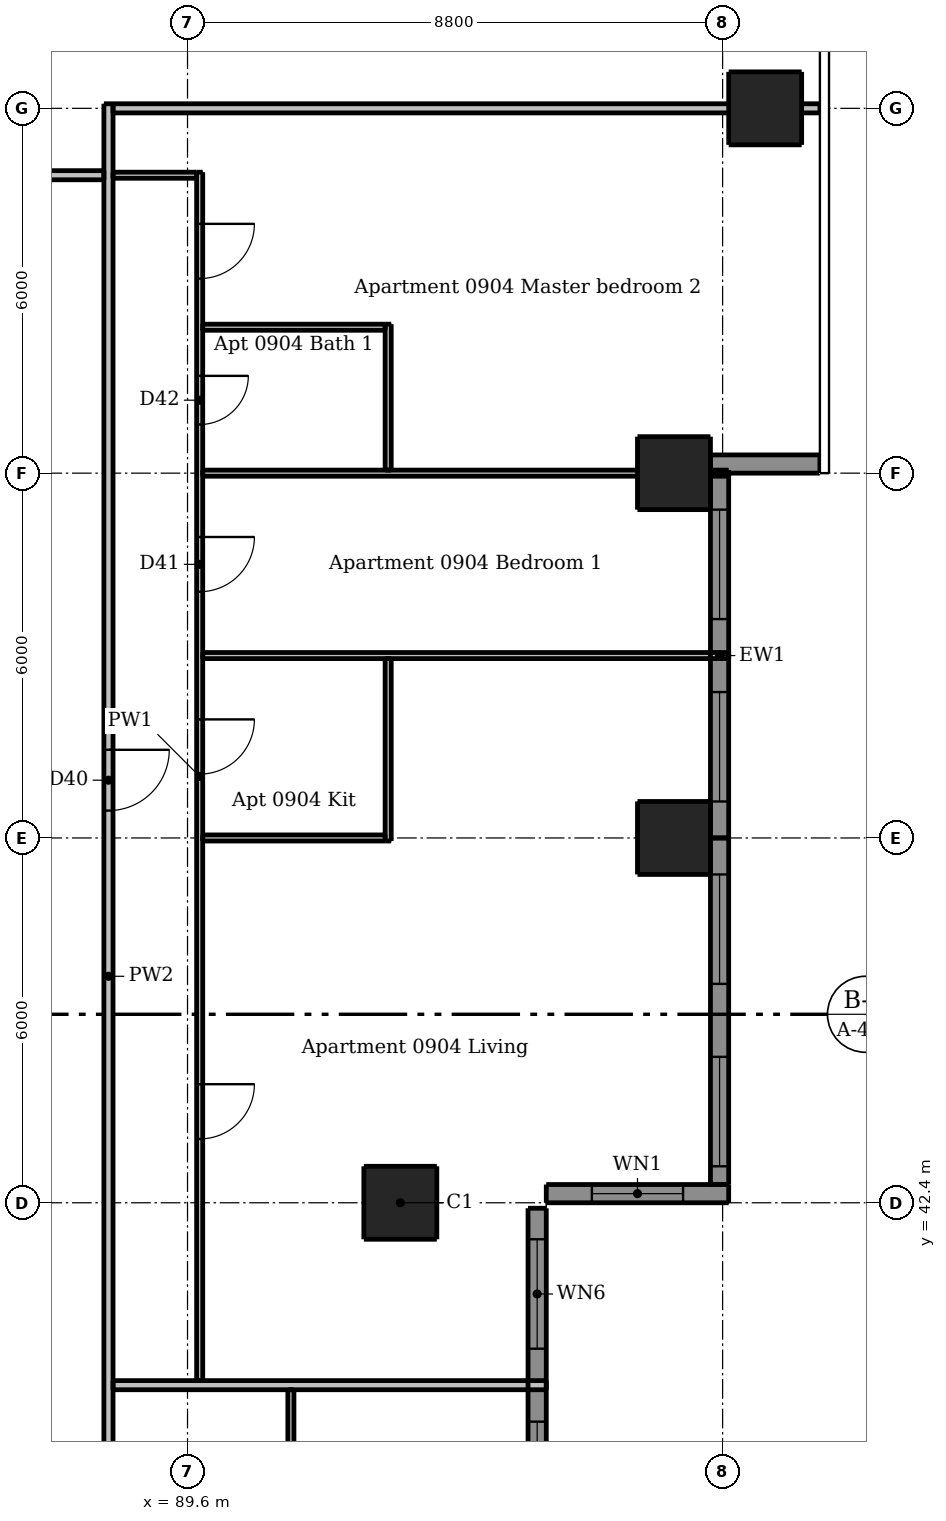
"""IFC4 building model, lengths in metres.
Left out: names, types, materials, properties, quantities, classifications, styles, units other than length and angle.
Written with IfcOpenShell. Run it as: python <this file> out.ifc"""

import sys

from ifc_helpers import new_model, si_unit, direction, frame, frame_2d, origin, origin_2d, place, context, subcontext, project, spatial, rectangle, extrude, element, fill, save


model = new_model("IFC4")
c1 = context("Model", 3, precision=1e-05, world=origin(), true_north=direction((0.0, 1.0)))
c2 = subcontext(c1, "Body", "Model", "MODEL_VIEW")
j1 = project(units=[si_unit("LENGTHUNIT", "METRE"), si_unit("PLANEANGLEUNIT", "RADIAN")], contexts=[c1])
p1 = place(None, origin())
s1 = spatial("IfcSite", under=j1, at=p1, CompositionType="ELEMENT")
p2 = place(p1, origin())
s2 = spatial("IfcBuilding", under=s1, at=p2, CompositionType="ELEMENT")
p3 = place(p2, frame((0.0, 0.0, 36.7)))
s3 = spatial("IfcBuildingStorey", under=s2, at=p3, CompositionType="ELEMENT", Elevation=36.7)
for number, where, z_axis, x_axis in (
    (1, (93.1, 42.4, 0.0), (0.0, 0.0, 1.0), (1.0, 0.0, 0.0)),
    (2, (97.6, 48.4, 0.0), (0.0, 0.0, 1.0), (1.0, 0.0, 0.0)),
    (3, (97.6, 54.4, 0.0), (0.0, 0.0, 1.0), (1.0, 0.0, 0.0)),
    (4, (99.1, 60.4, 0.0), (0.0, 0.0, 1.0), (1.0, 0.0, 0.0)),
):
    element("IfcColumn", number, at=place(p3, frame(where, z_axis=z_axis, x_axis=x_axis)), inside=s3, PredefinedType="COLUMN", context=c2, shape_type="SweptSolid", body=[
        extrude(rectangle(XDim=1.2, YDim=1.2, at=origin_2d()), origin(), (0.0, 0.0, 1.0), 3.05),
    ])
p4 = place(p3, frame((95.5, 42.55, 0.0), z_axis=(0.0, 0.0, 1.0), x_axis=(1.0, 0.0, 0.0)))
e5 = element("IfcWall", 5, at=p4, inside=s3, PredefinedType="SOLIDWALL", context=c2, shape_type="SweptSolid", body=[
    extrude(rectangle(XDim=3.0, YDim=0.3, at=frame_2d((1.5, 0.0))), origin(), (0.0, 0.0, 1.0), 3.05),
])
p5 = place(p4, frame((0.75, 0.0, 0.9)))
e6 = element("IfcOpeningElement", 6, at=p5, cuts=e5, PredefinedType="OPENING", context=c2, shape_type="SweptSolid", body=[
    extrude(rectangle(XDim=1.5, YDim=1.5, at=frame_2d((0.75, 0.75))), frame((0.0, 0.16, 0.0), z_axis=(0.0, -1.0, 0.0), x_axis=(1.0, 0.0, 0.0)), (0.0, 0.0, 1.0), 0.32),
])
p6 = place(p3, frame((98.2, 54.55, 0.0), z_axis=(0.0, 0.0, 1.0), x_axis=(1.0, 0.0, 0.0)))
e7 = element("IfcWall", 7, at=p6, inside=s3, PredefinedType="SOLIDWALL", context=c2, shape_type="SweptSolid", body=[
    extrude(rectangle(XDim=1.8, YDim=0.3, at=frame_2d((0.9, 0.0))), origin(), (0.0, 0.0, 1.0), 3.05),
])
p7 = place(p3, frame((95.35, 36.7, 0.0), z_axis=(0.0, 0.0, 1.0), x_axis=(0.0, 1.0, 0.0)))
e8 = element("IfcWall", 8, at=p7, inside=s3, PredefinedType="SOLIDWALL", context=c2, shape_type="SweptSolid", body=[
    extrude(rectangle(XDim=5.61, YDim=0.3, at=frame_2d((2.805, 0.0))), origin(), (0.0, 0.0, 1.0), 3.05),
])
p8 = place(p7, frame((0.3, 0.0, 0.15)))
e9 = element("IfcOpeningElement", 9, at=p8, cuts=e8, PredefinedType="OPENING", context=c2, shape_type="SweptSolid", body=[
    extrude(rectangle(XDim=1.8, YDim=2.1, at=frame_2d((0.9, 1.05))), frame((0.0, 0.16, 0.0), z_axis=(0.0, -1.0, 0.0), x_axis=(1.0, 0.0, 0.0)), (0.0, 0.0, 1.0), 0.32),
])
p9 = place(p7, frame((3.3, 0.0, 0.15)))
e10 = element("IfcOpeningElement", 10, at=p9, cuts=e8, PredefinedType="OPENING", context=c2, shape_type="SweptSolid", body=[
    extrude(rectangle(XDim=1.8, YDim=2.1, at=frame_2d((0.9, 1.05))), frame((0.0, 0.16, 0.0), z_axis=(0.0, -1.0, 0.0), x_axis=(1.0, 0.0, 0.0)), (0.0, 0.0, 1.0), 0.32),
])
p10 = place(p3, frame((98.35, 42.7, 0.0), z_axis=(0.0, 0.0, 1.0), x_axis=(0.0, 1.0, 0.0)))
e11 = element("IfcWall", 11, at=p10, inside=s3, PredefinedType="SOLIDWALL", context=c2, shape_type="SweptSolid", body=[
    extrude(rectangle(XDim=5.7, YDim=0.3, at=frame_2d((2.85, 0.0))), origin(), (0.0, 0.0, 1.0), 3.05),
])
p11 = place(p10, frame((0.3, 0.0, 0.15)))
e12 = element("IfcOpeningElement", 12, at=p11, cuts=e11, PredefinedType="OPENING", context=c2, shape_type="SweptSolid", body=[
    extrude(rectangle(XDim=1.8, YDim=2.1, at=frame_2d((0.9, 1.05))), frame((0.0, 0.16, 0.0), z_axis=(0.0, -1.0, 0.0), x_axis=(1.0, 0.0, 0.0)), (0.0, 0.0, 1.0), 0.32),
])
p12 = place(p10, frame((3.3, 0.0, 0.15)))
e13 = element("IfcOpeningElement", 13, at=p12, cuts=e11, PredefinedType="OPENING", context=c2, shape_type="SweptSolid", body=[
    extrude(rectangle(XDim=1.8, YDim=2.1, at=frame_2d((0.9, 1.05))), frame((0.0, 0.16, 0.0), z_axis=(0.0, -1.0, 0.0), x_axis=(1.0, 0.0, 0.0)), (0.0, 0.0, 1.0), 0.32),
])
p13 = place(p3, frame((98.35, 48.4, 0.0), z_axis=(0.0, 0.0, 1.0), x_axis=(0.0, 1.0, 0.0)))
e14 = element("IfcWall", 14, at=p13, inside=s3, PredefinedType="SOLIDWALL", context=c2, shape_type="SweptSolid", body=[
    extrude(rectangle(XDim=6.0, YDim=0.3, at=frame_2d((3.0, 0.0))), origin(), (0.0, 0.0, 1.0), 3.05),
])
p14 = place(p13, frame((0.6, 0.0, 0.15)))
e15 = element("IfcOpeningElement", 15, at=p14, cuts=e14, PredefinedType="OPENING", context=c2, shape_type="SweptSolid", body=[
    extrude(rectangle(XDim=1.8, YDim=2.1, at=frame_2d((0.9, 1.05))), frame((0.0, 0.16, 0.0), z_axis=(0.0, -1.0, 0.0), x_axis=(1.0, 0.0, 0.0)), (0.0, 0.0, 1.0), 0.32),
])
p15 = place(p13, frame((3.6, 0.0, 0.15)))
e16 = element("IfcOpeningElement", 16, at=p15, cuts=e14, PredefinedType="OPENING", context=c2, shape_type="SweptSolid", body=[
    extrude(rectangle(XDim=1.8, YDim=2.1, at=frame_2d((0.9, 1.05))), frame((0.0, 0.16, 0.0), z_axis=(0.0, -1.0, 0.0), x_axis=(1.0, 0.0, 0.0)), (0.0, 0.0, 1.0), 0.32),
])
p16 = place(p3, frame((89.8, 59.35, 0.0), z_axis=(0.0, 0.0, 1.0), x_axis=(0.0, -1.0, 0.0)))
e17 = element("IfcWall", 17, at=p16, inside=s3, PredefinedType="PARTITIONING", context=c2, shape_type="SweptSolid", body=[
    extrude(rectangle(XDim=19.875, YDim=0.1, at=frame_2d((9.938, 0.0))), origin(), (0.0, 0.0, 1.0), 3.05),
])
p17 = place(p16, frame((15.0, 0.0, 0.0)))
e18 = element("IfcOpeningElement", 18, at=p17, cuts=e17, PredefinedType="OPENING", context=c2, shape_type="SweptSolid", body=[
    extrude(rectangle(XDim=0.9, YDim=2.1, at=frame_2d((0.45, 1.05))), frame((0.0, 0.06, 0.0), z_axis=(0.0, -1.0, 0.0), x_axis=(1.0, 0.0, 0.0)), (0.0, 0.0, 1.0), 0.12),
])
p18 = place(p16, frame((9.0, 0.0, 0.0)))
e19 = element("IfcOpeningElement", 19, at=p18, cuts=e17, PredefinedType="OPENING", context=c2, shape_type="SweptSolid", body=[
    extrude(rectangle(XDim=0.9, YDim=2.1, at=frame_2d((0.45, 1.05))), frame((0.0, 0.06, 0.0), z_axis=(0.0, -1.0, 0.0), x_axis=(1.0, 0.0, 0.0)), (0.0, 0.0, 1.0), 0.12),
])
p19 = place(p16, frame((6.0, 0.0, 0.0)))
e20 = element("IfcOpeningElement", 20, at=p19, cuts=e17, PredefinedType="OPENING", context=c2, shape_type="SweptSolid", body=[
    extrude(rectangle(XDim=0.9, YDim=2.1, at=frame_2d((0.45, 1.05))), frame((0.0, 0.06, 0.0), z_axis=(0.0, -1.0, 0.0), x_axis=(1.0, 0.0, 0.0)), (0.0, 0.0, 1.0), 0.12),
])
p20 = place(p16, frame((0.85, 0.0, 0.0)))
e21 = element("IfcOpeningElement", 21, at=p20, cuts=e17, PredefinedType="OPENING", context=c2, shape_type="SweptSolid", body=[
    extrude(rectangle(XDim=0.9, YDim=2.1, at=frame_2d((0.45, 1.05))), frame((0.0, 0.06, 0.0), z_axis=(0.0, -1.0, 0.0), x_axis=(1.0, 0.0, 0.0)), (0.0, 0.0, 1.0), 0.12),
])
p21 = place(p16, frame((3.35, 0.0, 0.0)))
e22 = element("IfcOpeningElement", 22, at=p21, cuts=e17, PredefinedType="OPENING", context=c2, shape_type="SweptSolid", body=[
    extrude(rectangle(XDim=0.8, YDim=2.1, at=frame_2d((0.4, 1.05))), frame((0.0, 0.06, 0.0), z_axis=(0.0, -1.0, 0.0), x_axis=(1.0, 0.0, 0.0)), (0.0, 0.0, 1.0), 0.12),
])
p22 = place(p3, frame((91.3, 33.45, 0.0), z_axis=(0.0, 0.0, 1.0), x_axis=(0.0, 1.0, 0.0)))
e23 = element("IfcWall", 23, at=p22, inside=s3, PredefinedType="PARTITIONING", context=c2, shape_type="SweptSolid", body=[
    extrude(rectangle(XDim=5.875, YDim=0.1, at=frame_2d((2.938, 0.0))), origin(), (0.0, 0.0, 1.0), 3.05),
])
p23 = place(p22, frame((3.75, 0.0, 0.0)))
e24 = element("IfcOpeningElement", 24, at=p23, cuts=e23, PredefinedType="OPENING", context=c2, shape_type="SweptSolid", body=[
    extrude(rectangle(XDim=0.8, YDim=2.1, at=frame_2d((0.4, 1.05))), frame((0.0, 0.06, 0.0), z_axis=(0.0, -1.0, 0.0), x_axis=(1.0, 0.0, 0.0)), (0.0, 0.0, 1.0), 0.12),
])
p24 = place(p3, frame((92.9, 48.35, 0.0), z_axis=(0.0, 0.0, 1.0), x_axis=(0.0, 1.0, 0.0)))
e25 = element("IfcWall", 25, at=p24, inside=s3, PredefinedType="PARTITIONING", context=c2, shape_type="SweptSolid", body=[
    extrude(rectangle(XDim=3.0, YDim=0.1, at=frame_2d((1.5, 0.0))), origin(), (0.0, 0.0, 1.0), 3.05),
])
p25 = place(p3, frame((92.9, 54.45, 0.0), z_axis=(0.0, 0.0, 1.0), x_axis=(0.0, 1.0, 0.0)))
e26 = element("IfcWall", 26, at=p25, inside=s3, PredefinedType="PARTITIONING", context=c2, shape_type="SweptSolid", body=[
    extrude(rectangle(XDim=2.4, YDim=0.1, at=frame_2d((1.2, 0.0))), origin(), (0.0, 0.0, 1.0), 3.05),
])
p26 = place(p3, frame((88.375, 59.3, 0.0), z_axis=(0.0, 0.0, 1.0), x_axis=(1.0, 0.0, 0.0)))
e27 = element("IfcWall", 27, at=p26, inside=s3, PredefinedType="PARTITIONING", context=c2, shape_type="SweptSolid", body=[
    extrude(rectangle(XDim=1.375, YDim=0.1, at=frame_2d((0.688, 0.0))), origin(), (0.0, 0.0, 1.0), 3.05),
])
p27 = place(p3, frame((89.85, 56.8, 0.0), z_axis=(0.0, 0.0, 1.0), x_axis=(1.0, 0.0, 0.0)))
e28 = element("IfcWall", 28, at=p27, inside=s3, PredefinedType="PARTITIONING", context=c2, shape_type="SweptSolid", body=[
    extrude(rectangle(XDim=3.0, YDim=0.1, at=frame_2d((1.5, 0.0))), origin(), (0.0, 0.0, 1.0), 3.05),
])
p28 = place(p3, frame((89.85, 54.4, 0.0), z_axis=(0.0, 0.0, 1.0), x_axis=(1.0, 0.0, 0.0)))
e29 = element("IfcWall", 29, at=p28, inside=s3, PredefinedType="PARTITIONING", context=c2, shape_type="SweptSolid", body=[
    extrude(rectangle(XDim=8.65, YDim=0.1, at=frame_2d((4.325, 0.0))), origin(), (0.0, 0.0, 1.0), 2.516),
])
p29 = place(p3, frame((89.85, 51.4, 0.0), z_axis=(0.0, 0.0, 1.0), x_axis=(1.0, 0.0, 0.0)))
e30 = element("IfcWall", 30, at=p29, inside=s3, PredefinedType="PARTITIONING", context=c2, shape_type="SweptSolid", body=[
    extrude(rectangle(XDim=8.65, YDim=0.1, at=frame_2d((4.325, 0.0))), origin(), (0.0, 0.0, 1.0), 3.05),
])
p30 = place(p3, frame((89.85, 48.4, 0.0), z_axis=(0.0, 0.0, 1.0), x_axis=(1.0, 0.0, 0.0)))
e31 = element("IfcWall", 31, at=p30, inside=s3, PredefinedType="PARTITIONING", context=c2, shape_type="SweptSolid", body=[
    extrude(rectangle(XDim=3.0, YDim=0.1, at=frame_2d((1.5, 0.0))), origin(), (0.0, 0.0, 1.0), 2.516),
])
p31 = place(p3, frame((88.3, 60.475, 0.0), z_axis=(0.0, 0.0, 1.0), x_axis=(0.0, -1.0, 0.0)))
e32 = element("IfcWall", 32, at=p31, inside=s3, PredefinedType="PARTITIONING", context=c2, shape_type="SweptSolid", body=[
    extrude(rectangle(XDim=28.7, YDim=0.15, at=frame_2d((14.35, 0.0))), origin(), (0.0, 0.0, 1.0), 3.05),
])
p32 = place(p31, frame((27.425, 0.0, 0.0)))
e33 = element("IfcOpeningElement", 33, at=p32, cuts=e32, PredefinedType="OPENING", context=c2, shape_type="SweptSolid", body=[
    extrude(rectangle(XDim=1.0, YDim=2.1, at=frame_2d((0.5, 1.05))), frame((0.0, 0.085, 0.0), z_axis=(0.0, -1.0, 0.0), x_axis=(1.0, 0.0, 0.0)), (0.0, 0.0, 1.0), 0.17),
])
p33 = place(p31, frame((10.625, 0.0, 0.0)))
e34 = element("IfcOpeningElement", 34, at=p33, cuts=e32, PredefinedType="OPENING", context=c2, shape_type="SweptSolid", body=[
    extrude(rectangle(XDim=1.0, YDim=2.1, at=frame_2d((0.5, 1.05))), frame((0.0, 0.085, 0.0), z_axis=(0.0, -1.0, 0.0), x_axis=(1.0, 0.0, 0.0)), (0.0, 0.0, 1.0), 0.17),
])
p34 = place(p3, frame((88.375, 60.4, 0.0), z_axis=(0.0, 0.0, 1.0), x_axis=(1.0, 0.0, 0.0)))
e35 = element("IfcWall", 35, at=p34, inside=s3, PredefinedType="PARTITIONING", context=c2, shape_type="SweptSolid", body=[
    extrude(rectangle(XDim=11.625, YDim=0.15, at=frame_2d((5.812, 0.0))), origin(), (0.0, 0.0, 1.0), 2.516),
])
p35 = place(p3, frame((59.675, 59.3, 0.0), z_axis=(0.0, 0.0, 1.0), x_axis=(1.0, 0.0, 0.0)))
e36 = element("IfcWall", 36, at=p35, inside=s3, PredefinedType="PARTITIONING", context=c2, shape_type="SweptSolid", body=[
    extrude(rectangle(XDim=28.55, YDim=0.15, at=frame_2d((14.275, 0.0))), origin(), (0.0, 0.0, 1.0), 3.05),
])
p36 = place(p35, frame((8.975, 0.0, 0.0)))
e37 = element("IfcOpeningElement", 37, at=p36, cuts=e36, PredefinedType="OPENING", context=c2, shape_type="SweptSolid", body=[
    extrude(rectangle(XDim=1.0, YDim=2.1, at=frame_2d((0.5, 1.05))), frame((0.0, 0.085, 0.0), z_axis=(0.0, -1.0, 0.0), x_axis=(1.0, 0.0, 0.0)), (0.0, 0.0, 1.0), 0.17),
])
p37 = place(p35, frame((25.775, 0.0, 0.0)))
e38 = element("IfcOpeningElement", 38, at=p37, cuts=e36, PredefinedType="OPENING", context=c2, shape_type="SweptSolid", body=[
    extrude(rectangle(XDim=1.0, YDim=2.1, at=frame_2d((0.5, 1.05))), frame((0.0, 0.085, 0.0), z_axis=(0.0, -1.0, 0.0), x_axis=(1.0, 0.0, 0.0)), (0.0, 0.0, 1.0), 0.17),
])
p38 = place(p3, frame((88.375, 39.4, 0.0), z_axis=(0.0, 0.0, 1.0), x_axis=(1.0, 0.0, 0.0)))
e39 = element("IfcWall", 39, at=p38, inside=s3, PredefinedType="PARTITIONING", context=c2, shape_type="SweptSolid", body=[
    extrude(rectangle(XDim=7.125, YDim=0.15, at=frame_2d((3.562, 0.0))), origin(), (0.0, 0.0, 1.0), 3.05),
])
p39 = place(p5, origin())
e40 = element("IfcWindow", 40, at=p39, inside=s3, PartitioningType="DOUBLE_PANEL_VERTICAL", PredefinedType="WINDOW", context=c2, shape_type="SweptSolid", body=[
    extrude(rectangle(XDim=1.5, YDim=1.5, at=frame_2d((0.75, 0.75))), frame((0.0, 0.03, 0.0), z_axis=(0.0, -1.0, 0.0), x_axis=(1.0, 0.0, 0.0)), (0.0, 0.0, 1.0), 0.06),
])
fill(e6, e40)
p40 = place(p8, origin())
e41 = element("IfcWindow", 41, at=p40, inside=s3, PartitioningType="DOUBLE_PANEL_VERTICAL", PredefinedType="WINDOW", context=c2, shape_type="SweptSolid", body=[
    extrude(rectangle(XDim=1.8, YDim=2.1, at=frame_2d((0.9, 1.05))), frame((0.0, 0.03, 0.0), z_axis=(0.0, -1.0, 0.0), x_axis=(1.0, 0.0, 0.0)), (0.0, 0.0, 1.0), 0.06),
])
fill(e9, e41)
p41 = place(p9, origin())
e42 = element("IfcWindow", 42, at=p41, inside=s3, PartitioningType="DOUBLE_PANEL_VERTICAL", PredefinedType="WINDOW", context=c2, shape_type="SweptSolid", body=[
    extrude(rectangle(XDim=1.8, YDim=2.1, at=frame_2d((0.9, 1.05))), frame((0.0, 0.03, 0.0), z_axis=(0.0, -1.0, 0.0), x_axis=(1.0, 0.0, 0.0)), (0.0, 0.0, 1.0), 0.06),
])
fill(e10, e42)
p42 = place(p11, origin())
e43 = element("IfcWindow", 43, at=p42, inside=s3, PartitioningType="DOUBLE_PANEL_VERTICAL", PredefinedType="WINDOW", context=c2, shape_type="SweptSolid", body=[
    extrude(rectangle(XDim=1.8, YDim=2.1, at=frame_2d((0.9, 1.05))), frame((0.0, 0.03, 0.0), z_axis=(0.0, -1.0, 0.0), x_axis=(1.0, 0.0, 0.0)), (0.0, 0.0, 1.0), 0.06),
])
fill(e12, e43)
p43 = place(p12, origin())
e44 = element("IfcWindow", 44, at=p43, inside=s3, PartitioningType="DOUBLE_PANEL_VERTICAL", PredefinedType="WINDOW", context=c2, shape_type="SweptSolid", body=[
    extrude(rectangle(XDim=1.8, YDim=2.1, at=frame_2d((0.9, 1.05))), frame((0.0, 0.03, 0.0), z_axis=(0.0, -1.0, 0.0), x_axis=(1.0, 0.0, 0.0)), (0.0, 0.0, 1.0), 0.06),
])
fill(e13, e44)
p44 = place(p14, origin())
e45 = element("IfcWindow", 45, at=p44, inside=s3, PartitioningType="DOUBLE_PANEL_VERTICAL", PredefinedType="WINDOW", context=c2, shape_type="SweptSolid", body=[
    extrude(rectangle(XDim=1.8, YDim=2.1, at=frame_2d((0.9, 1.05))), frame((0.0, 0.03, 0.0), z_axis=(0.0, -1.0, 0.0), x_axis=(1.0, 0.0, 0.0)), (0.0, 0.0, 1.0), 0.06),
])
fill(e15, e45)
p45 = place(p15, origin())
e46 = element("IfcWindow", 46, at=p45, inside=s3, PartitioningType="DOUBLE_PANEL_VERTICAL", PredefinedType="WINDOW", context=c2, shape_type="SweptSolid", body=[
    extrude(rectangle(XDim=1.8, YDim=2.1, at=frame_2d((0.9, 1.05))), frame((0.0, 0.03, 0.0), z_axis=(0.0, -1.0, 0.0), x_axis=(1.0, 0.0, 0.0)), (0.0, 0.0, 1.0), 0.06),
])
fill(e16, e46)
p46 = place(p33, origin())
e47 = element("IfcDoor", 47, at=p46, inside=s3, OperationType="SINGLE_SWING_LEFT", PredefinedType="DOOR", context=c2, shape_type="SweptSolid", body=[
    extrude(rectangle(XDim=1.0, YDim=2.1, at=frame_2d((0.5, 1.05))), frame((0.0, 0.025, 0.0), z_axis=(0.0, -1.0, 0.0), x_axis=(1.0, 0.0, 0.0)), (0.0, 0.0, 1.0), 0.05),
])
fill(e34, e47)
p47 = place(p17, origin())
e48 = element("IfcDoor", 48, at=p47, inside=s3, OperationType="SINGLE_SWING_LEFT", PredefinedType="DOOR", context=c2, shape_type="SweptSolid", body=[
    extrude(rectangle(XDim=0.9, YDim=2.1, at=frame_2d((0.45, 1.05))), frame((0.0, 0.025, 0.0), z_axis=(0.0, -1.0, 0.0), x_axis=(1.0, 0.0, 0.0)), (0.0, 0.0, 1.0), 0.05),
])
fill(e18, e48)
p48 = place(p18, origin())
e49 = element("IfcDoor", 49, at=p48, inside=s3, OperationType="SINGLE_SWING_LEFT", PredefinedType="DOOR", context=c2, shape_type="SweptSolid", body=[
    extrude(rectangle(XDim=0.9, YDim=2.1, at=frame_2d((0.45, 1.05))), frame((0.0, 0.025, 0.0), z_axis=(0.0, -1.0, 0.0), x_axis=(1.0, 0.0, 0.0)), (0.0, 0.0, 1.0), 0.05),
])
fill(e19, e49)
p49 = place(p19, origin())
e50 = element("IfcDoor", 50, at=p49, inside=s3, OperationType="SINGLE_SWING_LEFT", PredefinedType="DOOR", context=c2, shape_type="SweptSolid", body=[
    extrude(rectangle(XDim=0.9, YDim=2.1, at=frame_2d((0.45, 1.05))), frame((0.0, 0.025, 0.0), z_axis=(0.0, -1.0, 0.0), x_axis=(1.0, 0.0, 0.0)), (0.0, 0.0, 1.0), 0.05),
])
fill(e20, e50)
p50 = place(p20, origin())
e51 = element("IfcDoor", 51, at=p50, inside=s3, OperationType="SINGLE_SWING_LEFT", PredefinedType="DOOR", context=c2, shape_type="SweptSolid", body=[
    extrude(rectangle(XDim=0.9, YDim=2.1, at=frame_2d((0.45, 1.05))), frame((0.0, 0.025, 0.0), z_axis=(0.0, -1.0, 0.0), x_axis=(1.0, 0.0, 0.0)), (0.0, 0.0, 1.0), 0.05),
])
fill(e21, e51)
p51 = place(p21, origin())
e52 = element("IfcDoor", 52, at=p51, inside=s3, OperationType="SINGLE_SWING_LEFT", PredefinedType="DOOR", context=c2, shape_type="SweptSolid", body=[
    extrude(rectangle(XDim=0.8, YDim=2.1, at=frame_2d((0.4, 1.05))), frame((0.0, 0.025, 0.0), z_axis=(0.0, -1.0, 0.0), x_axis=(1.0, 0.0, 0.0)), (0.0, 0.0, 1.0), 0.05),
])
fill(e22, e52)
save(model, sys.argv[1])
